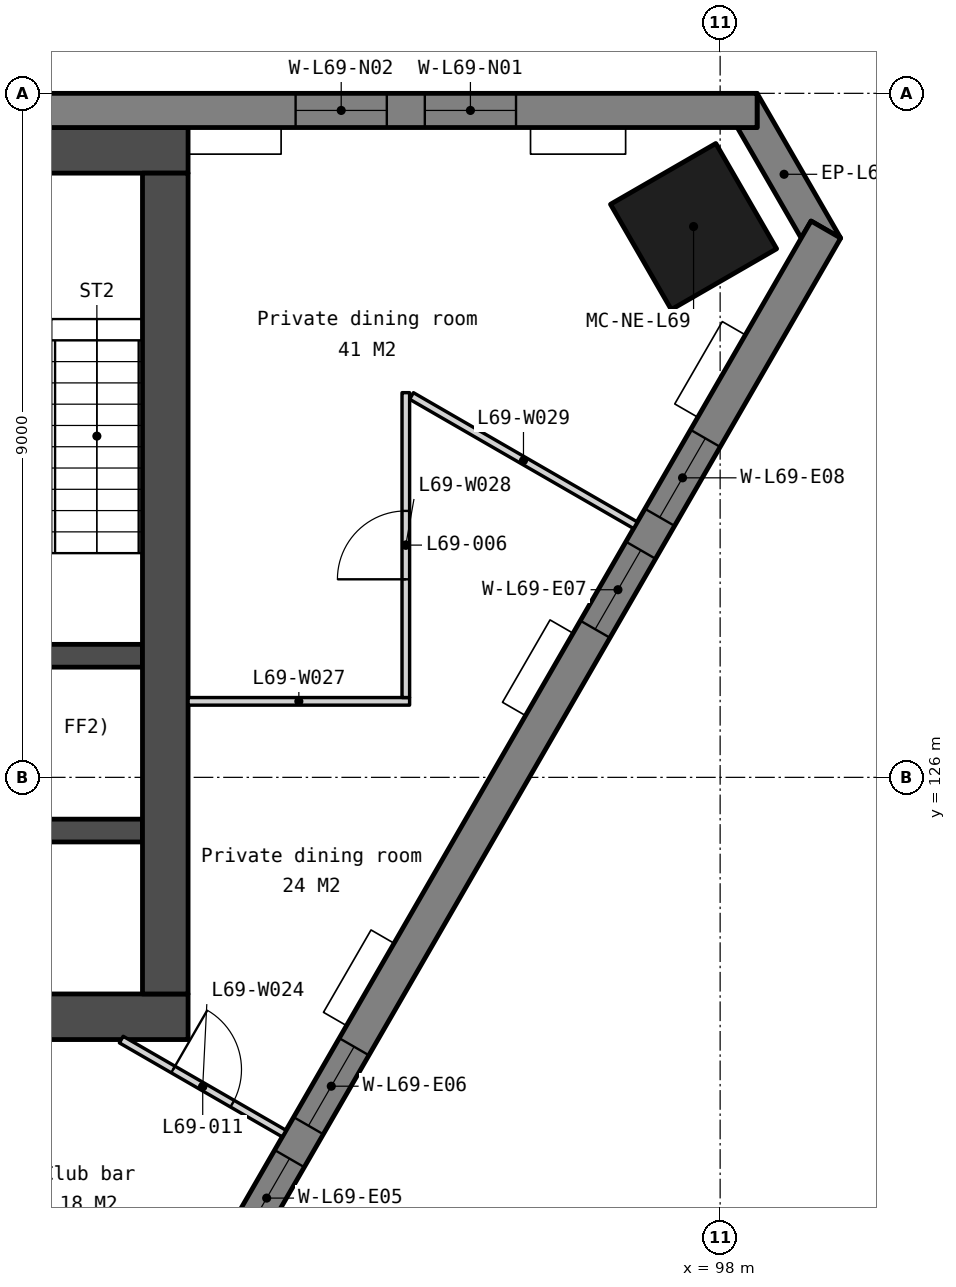
"""IFC4 building model, lengths in metres.
Left out: names, types, materials, properties, quantities, classifications, styles, units other than length and angle.
Written with IfcOpenShell. Run it as: python <this file> out.ifc"""

import sys

from ifc_helpers import new_model, si_unit, direction, frame, frame_2d, origin, origin_2d, place, context, subcontext, project, spatial, polyline, rectangle, outline, extrude, element, fill, save


model = new_model("IFC4")
c1 = context("Model", 3, precision=1e-05, world=origin(), true_north=direction((0.0, 1.0)))
c2 = subcontext(c1, "Body", "Model", "MODEL_VIEW")
j1 = project(units=[si_unit("LENGTHUNIT", "METRE"), si_unit("PLANEANGLEUNIT", "RADIAN")], contexts=[c1])
p1 = place(None, origin())
s1 = spatial("IfcSite", under=j1, at=p1, CompositionType="ELEMENT")
p2 = place(p1, origin())
s2 = spatial("IfcBuilding", under=s1, at=p2, CompositionType="ELEMENT")
p3 = place(p2, frame((0.0, 0.0, 281.6)))
s3 = spatial("IfcBuildingStorey", under=s2, at=p3, CompositionType="ELEMENT", Elevation=281.6)
p4 = place(p3, frame((97.651, 133.247, 0.0), z_axis=(0.0, 0.0, 1.0), x_axis=(-0.5, 0.866025403784, 0.0)))
e1 = element("IfcColumn", 1, at=p4, inside=s3, PredefinedType="COLUMN", context=c2, shape_type="SweptSolid", body=[
    extrude(rectangle(XDim=1.6, YDim=1.6, at=origin_2d()), origin(), (0.0, 0.0, 1.0), 3.9),
])
p5 = place(p3, frame((69.0, 134.25, 0.0), z_axis=(0.0, 0.0, 1.0), x_axis=(1.0, 0.0, 0.0)))
e2 = element("IfcWall", 2, at=p5, inside=s3, PredefinedType="SOLIDWALL", context=c2, shape_type="SweptSolid", body=[
    extrude(rectangle(XDim=22.0, YDim=0.6, at=frame_2d((11.0, 0.0))), origin(), (0.0, 0.0, 1.0), 3.5),
])
p6 = place(p3, frame((69.0, 122.85, 0.0), z_axis=(0.0, 0.0, 1.0), x_axis=(1.0, 0.0, 0.0)))
e3 = element("IfcWall", 3, at=p6, inside=s3, PredefinedType="SOLIDWALL", context=c2, shape_type="SweptSolid", body=[
    extrude(rectangle(XDim=22.0, YDim=0.6, at=frame_2d((11.0, 0.0))), origin(), (0.0, 0.0, 1.0), 3.5),
])
p7 = place(p6, frame((16.375, 0.0, 0.0)))
e4 = element("IfcOpeningElement", 4, at=p7, cuts=e3, PredefinedType="OPENING", context=c2, shape_type="SweptSolid", body=[
    extrude(rectangle(XDim=1.8, YDim=2.1, at=frame_2d((0.9, 1.05))), frame((0.0, 0.31, 0.0), z_axis=(0.0, -1.0, 0.0), x_axis=(1.0, 0.0, 0.0)), (0.0, 0.0, 1.0), 0.62),
])
p8 = place(p6, frame((3.825, 0.0, 0.0)))
e5 = element("IfcOpeningElement", 5, at=p8, cuts=e3, PredefinedType="OPENING", context=c2, shape_type="SweptSolid", body=[
    extrude(rectangle(XDim=1.8, YDim=2.1, at=frame_2d((0.9, 1.05))), frame((0.0, 0.31, 0.0), z_axis=(0.0, -1.0, 0.0), x_axis=(1.0, 0.0, 0.0)), (0.0, 0.0, 1.0), 0.62),
])
p9 = place(p6, frame((12.85, 0.0, 0.0)))
e6 = element("IfcOpeningElement", 6, at=p9, cuts=e3, PredefinedType="OPENING", context=c2, shape_type="SweptSolid", body=[
    extrude(rectangle(XDim=1.5, YDim=2.1, at=frame_2d((0.75, 1.05))), frame((0.0, 0.31, 0.0), z_axis=(0.0, -1.0, 0.0), x_axis=(1.0, 0.0, 0.0)), (0.0, 0.0, 1.0), 0.62),
])
for number, where, z_axis, x_axis in (
    (7, (87.85, 127.6, 0.0), (0.0, 0.0, 1.0), (1.0, 0.0, 0.0)),
    (8, (87.85, 125.3, 0.0), (0.0, 0.0, 1.0), (1.0, 0.0, 0.0)),
):
    element("IfcWall", number, at=place(p3, frame(where, z_axis=z_axis, x_axis=x_axis)), inside=s3, PredefinedType="SOLIDWALL", context=c2, shape_type="SweptSolid", body=[
        extrude(rectangle(XDim=2.55, YDim=0.3, at=frame_2d((1.275, 0.0))), origin(), (0.0, 0.0, 1.0), 3.5),
    ])
p10 = place(p3, frame((90.7, 133.95, 0.0), z_axis=(0.0, 0.0, 1.0), x_axis=(0.0, -1.0, 0.0)))
e9 = element("IfcWall", 9, at=p10, inside=s3, PredefinedType="SOLIDWALL", context=c2, shape_type="SweptSolid", body=[
    extrude(rectangle(XDim=10.8, YDim=0.6, at=frame_2d((5.4, 0.0))), origin(), (0.0, 0.0, 1.0), 3.5),
])
p11 = place(p3, frame((0.0, 0.0, -0.15)))
e10 = element("IfcWall", 10, at=p11, inside=s3, PredefinedType="SOLIDWALL", context=c2, shape_type="SweptSolid", body=[
    extrude(outline(polyline([(99.586, 133.095), (99.197, 133.32), (99.067, 133.095), (98.226, 134.55), (98.486, 134.55), (98.486, 135.0), (99.586, 133.095)])), origin(), (0.0, 0.0, 1.0), 3.55),
])
p12 = place(p3, frame((98.486, 134.775, -0.15), z_axis=(0.0, 0.0, 1.0), x_axis=(-1.0, 0.0, 0.0)))
e11 = element("IfcWall", 11, at=p12, inside=s3, PredefinedType="SOLIDWALL", context=c2, shape_type="SweptSolid", body=[
    extrude(outline(polyline([(36.972, 0.0), (36.972, 3.55), (0.0, 3.55), (0.0, 0.0), (36.972, 0.0)])), frame((0.0, 0.225, 0.0), z_axis=(0.0, -1.0, 0.0), x_axis=(1.0, 0.0, 0.0)), (0.0, 0.0, 1.0), 0.45),
])
p13 = place(p12, frame((3.172, 0.0, 0.95)))
e12 = element("IfcOpeningElement", 12, at=p13, cuts=e11, PredefinedType="OPENING", context=c2, shape_type="SweptSolid", body=[
    extrude(rectangle(XDim=1.2, YDim=2.2, at=frame_2d((0.6, 1.1))), frame((0.0, 0.235, 0.0), z_axis=(0.0, -1.0, 0.0), x_axis=(1.0, 0.0, 0.0)), (0.0, 0.0, 1.0), 0.47),
])
p14 = place(p12, frame((4.872, 0.0, 0.95)))
e13 = element("IfcOpeningElement", 13, at=p14, cuts=e11, PredefinedType="OPENING", context=c2, shape_type="SweptSolid", body=[
    extrude(rectangle(XDim=1.2, YDim=2.2, at=frame_2d((0.6, 1.1))), frame((0.0, 0.235, 0.0), z_axis=(0.0, -1.0, 0.0), x_axis=(1.0, 0.0, 0.0)), (0.0, 0.0, 1.0), 0.47),
])
p15 = place(p12, frame((12.415, 0.0, 0.95)))
e14 = element("IfcOpeningElement", 14, at=p15, cuts=e11, PredefinedType="OPENING", context=c2, shape_type="SweptSolid", body=[
    extrude(rectangle(XDim=1.2, YDim=2.2, at=frame_2d((0.6, 1.1))), frame((0.0, 0.235, 0.0), z_axis=(0.0, -1.0, 0.0), x_axis=(1.0, 0.0, 0.0)), (0.0, 0.0, 1.0), 0.47),
])
p16 = place(p12, frame((14.115, 0.0, 0.95)))
e15 = element("IfcOpeningElement", 15, at=p16, cuts=e11, PredefinedType="OPENING", context=c2, shape_type="SweptSolid", body=[
    extrude(rectangle(XDim=1.2, YDim=2.2, at=frame_2d((0.6, 1.1))), frame((0.0, 0.235, 0.0), z_axis=(0.0, -1.0, 0.0), x_axis=(1.0, 0.0, 0.0)), (0.0, 0.0, 1.0), 0.47),
])
p17 = place(p12, frame((21.658, 0.0, 0.95)))
e16 = element("IfcOpeningElement", 16, at=p17, cuts=e11, PredefinedType="OPENING", context=c2, shape_type="SweptSolid", body=[
    extrude(rectangle(XDim=1.2, YDim=2.2, at=frame_2d((0.6, 1.1))), frame((0.0, 0.235, 0.0), z_axis=(0.0, -1.0, 0.0), x_axis=(1.0, 0.0, 0.0)), (0.0, 0.0, 1.0), 0.47),
])
p18 = place(p12, frame((23.358, 0.0, 0.95)))
e17 = element("IfcOpeningElement", 17, at=p18, cuts=e11, PredefinedType="OPENING", context=c2, shape_type="SweptSolid", body=[
    extrude(rectangle(XDim=1.2, YDim=2.2, at=frame_2d((0.6, 1.1))), frame((0.0, 0.235, 0.0), z_axis=(0.0, -1.0, 0.0), x_axis=(1.0, 0.0, 0.0)), (0.0, 0.0, 1.0), 0.47),
])
p19 = place(p12, frame((30.901, 0.0, 0.95)))
e18 = element("IfcOpeningElement", 18, at=p19, cuts=e11, PredefinedType="OPENING", context=c2, shape_type="SweptSolid", body=[
    extrude(rectangle(XDim=1.2, YDim=2.2, at=frame_2d((0.6, 1.1))), frame((0.0, 0.235, 0.0), z_axis=(0.0, -1.0, 0.0), x_axis=(1.0, 0.0, 0.0)), (0.0, 0.0, 1.0), 0.47),
])
p20 = place(p12, frame((32.601, 0.0, 0.95)))
e19 = element("IfcOpeningElement", 19, at=p20, cuts=e11, PredefinedType="OPENING", context=c2, shape_type="SweptSolid", body=[
    extrude(rectangle(XDim=1.2, YDim=2.2, at=frame_2d((0.6, 1.1))), frame((0.0, 0.235, 0.0), z_axis=(0.0, -1.0, 0.0), x_axis=(1.0, 0.0, 0.0)), (0.0, 0.0, 1.0), 0.47),
])
p21 = place(p3, frame((80.905, 101.188, -0.15), z_axis=(0.0, 0.0, 1.0), x_axis=(0.500002536638, 0.866023939251, 0.0)))
e20 = element("IfcWall", 20, at=p21, inside=s3, PredefinedType="SOLIDWALL", context=c2, shape_type="SweptSolid", body=[
    extrude(outline(polyline([(36.972, 0.0), (36.972, 3.55), (0.0, 3.55), (0.0, 0.0), (36.972, 0.0)])), frame((0.0, 0.225, 0.0), z_axis=(0.0, -1.0, 0.0), x_axis=(1.0, 0.0, 0.0)), (0.0, 0.0, 1.0), 0.45),
])
p22 = place(p21, frame((3.172, 0.0, 0.95)))
e21 = element("IfcOpeningElement", 21, at=p22, cuts=e20, PredefinedType="OPENING", context=c2, shape_type="SweptSolid", body=[
    extrude(rectangle(XDim=1.2, YDim=2.2, at=frame_2d((0.6, 1.1))), frame((0.0, 0.235, 0.0), z_axis=(0.0, -1.0, 0.0), x_axis=(1.0, 0.0, 0.0)), (0.0, 0.0, 1.0), 0.47),
])
p23 = place(p21, frame((4.872, 0.0, 0.95)))
e22 = element("IfcOpeningElement", 22, at=p23, cuts=e20, PredefinedType="OPENING", context=c2, shape_type="SweptSolid", body=[
    extrude(rectangle(XDim=1.2, YDim=2.2, at=frame_2d((0.6, 1.1))), frame((0.0, 0.235, 0.0), z_axis=(0.0, -1.0, 0.0), x_axis=(1.0, 0.0, 0.0)), (0.0, 0.0, 1.0), 0.47),
])
p24 = place(p21, frame((12.415, 0.0, 0.95)))
e23 = element("IfcOpeningElement", 23, at=p24, cuts=e20, PredefinedType="OPENING", context=c2, shape_type="SweptSolid", body=[
    extrude(rectangle(XDim=1.2, YDim=2.2, at=frame_2d((0.6, 1.1))), frame((0.0, 0.235, 0.0), z_axis=(0.0, -1.0, 0.0), x_axis=(1.0, 0.0, 0.0)), (0.0, 0.0, 1.0), 0.47),
])
p25 = place(p21, frame((14.115, 0.0, 0.95)))
e24 = element("IfcOpeningElement", 24, at=p25, cuts=e20, PredefinedType="OPENING", context=c2, shape_type="SweptSolid", body=[
    extrude(rectangle(XDim=1.2, YDim=2.2, at=frame_2d((0.6, 1.1))), frame((0.0, 0.235, 0.0), z_axis=(0.0, -1.0, 0.0), x_axis=(1.0, 0.0, 0.0)), (0.0, 0.0, 1.0), 0.47),
])
p26 = place(p21, frame((21.658, 0.0, 0.95)))
e25 = element("IfcOpeningElement", 25, at=p26, cuts=e20, PredefinedType="OPENING", context=c2, shape_type="SweptSolid", body=[
    extrude(rectangle(XDim=1.2, YDim=2.2, at=frame_2d((0.6, 1.1))), frame((0.0, 0.235, 0.0), z_axis=(0.0, -1.0, 0.0), x_axis=(1.0, 0.0, 0.0)), (0.0, 0.0, 1.0), 0.47),
])
p27 = place(p21, frame((23.358, 0.0, 0.95)))
e26 = element("IfcOpeningElement", 26, at=p27, cuts=e20, PredefinedType="OPENING", context=c2, shape_type="SweptSolid", body=[
    extrude(rectangle(XDim=1.2, YDim=2.2, at=frame_2d((0.6, 1.1))), frame((0.0, 0.235, 0.0), z_axis=(0.0, -1.0, 0.0), x_axis=(1.0, 0.0, 0.0)), (0.0, 0.0, 1.0), 0.47),
])
p28 = place(p21, frame((30.901, 0.0, 0.95)))
e27 = element("IfcOpeningElement", 27, at=p28, cuts=e20, PredefinedType="OPENING", context=c2, shape_type="SweptSolid", body=[
    extrude(rectangle(XDim=1.2, YDim=2.2, at=frame_2d((0.6, 1.1))), frame((0.0, 0.235, 0.0), z_axis=(0.0, -1.0, 0.0), x_axis=(1.0, 0.0, 0.0)), (0.0, 0.0, 1.0), 0.47),
])
p29 = place(p21, frame((32.601, 0.0, 0.95)))
e28 = element("IfcOpeningElement", 28, at=p29, cuts=e20, PredefinedType="OPENING", context=c2, shape_type="SweptSolid", body=[
    extrude(rectangle(XDim=1.2, YDim=2.2, at=frame_2d((0.6, 1.1))), frame((0.0, 0.235, 0.0), z_axis=(0.0, -1.0, 0.0), x_axis=(1.0, 0.0, 0.0)), (0.0, 0.0, 1.0), 0.47),
])
p30 = place(p3, frame((90.121, 122.55, 0.0), z_axis=(0.0, 0.0, 1.0), x_axis=(0.86604923931, -0.499958713387, 0.0)))
e29 = element("IfcWall", 29, at=p30, inside=s3, PredefinedType="PARTITIONING", context=c2, shape_type="SweptSolid", body=[
    extrude(rectangle(XDim=2.475, YDim=0.1, at=frame_2d((1.237, 0.0))), origin(), (0.0, 0.0, 1.0), 3.5),
])
p31 = place(p30, frame((0.787, 0.0, 0.0)))
e30 = element("IfcOpeningElement", 30, at=p31, cuts=e29, PredefinedType="OPENING", context=c2, shape_type="SweptSolid", body=[
    extrude(rectangle(XDim=0.9, YDim=2.1, at=frame_2d((0.45, 1.05))), frame((0.0, 0.06, 0.0), z_axis=(0.0, -1.0, 0.0), x_axis=(1.0, 0.0, 0.0)), (0.0, 0.0, 1.0), 0.12),
])
p32 = place(p3, frame((91.0, 127.0, 0.0), z_axis=(0.0, 0.0, 1.0), x_axis=(1.0, 0.0, 0.0)))
e31 = element("IfcWall", 31, at=p32, inside=s3, PredefinedType="PARTITIONING", context=c2, shape_type="SweptSolid", body=[
    extrude(rectangle(XDim=2.915, YDim=0.1, at=frame_2d((1.457, 0.0))), origin(), (0.0, 0.0, 1.0), 3.5),
])
p33 = place(p3, frame((93.865, 127.05, 0.0), z_axis=(0.0, 0.0, 1.0), x_axis=(0.0, 1.0, 0.0)))
e32 = element("IfcWall", 32, at=p33, inside=s3, PredefinedType="PARTITIONING", context=c2, shape_type="SweptSolid", body=[
    extrude(rectangle(XDim=4.011, YDim=0.1, at=frame_2d((2.006, 0.0))), origin(), (0.0, 0.0, 1.0), 3.5),
])
p34 = place(p33, frame((1.556, 0.0, 0.0)))
e33 = element("IfcOpeningElement", 33, at=p34, cuts=e32, PredefinedType="OPENING", context=c2, shape_type="SweptSolid", body=[
    extrude(rectangle(XDim=0.9, YDim=2.1, at=frame_2d((0.45, 1.05))), frame((0.0, 0.06, 0.0), z_axis=(0.0, -1.0, 0.0), x_axis=(1.0, 0.0, 0.0)), (0.0, 0.0, 1.0), 0.12),
])
p35 = place(p3, frame((93.94, 131.018, 0.0), z_axis=(0.0, 0.0, 1.0), x_axis=(0.866021851682, -0.500006152372, 0.0)))
e34 = element("IfcWall", 34, at=p35, inside=s3, PredefinedType="PARTITIONING", context=c2, shape_type="SweptSolid", body=[
    extrude(rectangle(XDim=3.402, YDim=0.1, at=frame_2d((1.701, 0.0))), origin(), (0.0, 0.0, 1.0), 3.5),
])
p36 = place(p13, origin())
e35 = element("IfcWindow", 35, at=p36, inside=s3, PartitioningType="SINGLE_PANEL", PredefinedType="WINDOW", context=c2, shape_type="SweptSolid", body=[
    extrude(rectangle(XDim=1.2, YDim=2.2, at=frame_2d((0.6, 1.1))), frame((0.0, 0.03, 0.0), z_axis=(0.0, -1.0, 0.0), x_axis=(1.0, 0.0, 0.0)), (0.0, 0.0, 1.0), 0.06),
])
fill(e12, e35)
p37 = place(p14, origin())
e36 = element("IfcWindow", 36, at=p37, inside=s3, PartitioningType="SINGLE_PANEL", PredefinedType="WINDOW", context=c2, shape_type="SweptSolid", body=[
    extrude(rectangle(XDim=1.2, YDim=2.2, at=frame_2d((0.6, 1.1))), frame((0.0, 0.03, 0.0), z_axis=(0.0, -1.0, 0.0), x_axis=(1.0, 0.0, 0.0)), (0.0, 0.0, 1.0), 0.06),
])
fill(e13, e36)
p38 = place(p26, origin())
e37 = element("IfcWindow", 37, at=p38, inside=s3, PartitioningType="SINGLE_PANEL", PredefinedType="WINDOW", context=c2, shape_type="SweptSolid", body=[
    extrude(rectangle(XDim=1.2, YDim=2.2, at=frame_2d((0.6, 1.1))), frame((0.0, 0.03, 0.0), z_axis=(0.0, -1.0, 0.0), x_axis=(1.0, 0.0, 0.0)), (0.0, 0.0, 1.0), 0.06),
])
fill(e25, e37)
p39 = place(p27, origin())
e38 = element("IfcWindow", 38, at=p39, inside=s3, PartitioningType="SINGLE_PANEL", PredefinedType="WINDOW", context=c2, shape_type="SweptSolid", body=[
    extrude(rectangle(XDim=1.2, YDim=2.2, at=frame_2d((0.6, 1.1))), frame((0.0, 0.03, 0.0), z_axis=(0.0, -1.0, 0.0), x_axis=(1.0, 0.0, 0.0)), (0.0, 0.0, 1.0), 0.06),
])
fill(e26, e38)
p40 = place(p28, origin())
e39 = element("IfcWindow", 39, at=p40, inside=s3, PartitioningType="SINGLE_PANEL", PredefinedType="WINDOW", context=c2, shape_type="SweptSolid", body=[
    extrude(rectangle(XDim=1.2, YDim=2.2, at=frame_2d((0.6, 1.1))), frame((0.0, 0.03, 0.0), z_axis=(0.0, -1.0, 0.0), x_axis=(1.0, 0.0, 0.0)), (0.0, 0.0, 1.0), 0.06),
])
fill(e27, e39)
p41 = place(p29, origin())
e40 = element("IfcWindow", 40, at=p41, inside=s3, PartitioningType="SINGLE_PANEL", PredefinedType="WINDOW", context=c2, shape_type="SweptSolid", body=[
    extrude(rectangle(XDim=1.2, YDim=2.2, at=frame_2d((0.6, 1.1))), frame((0.0, 0.03, 0.0), z_axis=(0.0, -1.0, 0.0), x_axis=(1.0, 0.0, 0.0)), (0.0, 0.0, 1.0), 0.06),
])
fill(e28, e40)
p42 = place(p34, origin())
e41 = element("IfcDoor", 41, at=p42, inside=s3, OperationType="SINGLE_SWING_LEFT", PredefinedType="DOOR", context=c2, shape_type="SweptSolid", body=[
    extrude(rectangle(XDim=0.9, YDim=2.1, at=frame_2d((0.45, 1.05))), frame((0.0, 0.025, 0.0), z_axis=(0.0, -1.0, 0.0), x_axis=(1.0, 0.0, 0.0)), (0.0, 0.0, 1.0), 0.05),
])
fill(e33, e41)
p43 = place(p31, origin())
e42 = element("IfcDoor", 42, at=p43, inside=s3, OperationType="SINGLE_SWING_LEFT", PredefinedType="DOOR", context=c2, shape_type="SweptSolid", body=[
    extrude(rectangle(XDim=0.9, YDim=2.1, at=frame_2d((0.45, 1.05))), frame((0.0, 0.025, 0.0), z_axis=(0.0, -1.0, 0.0), x_axis=(1.0, 0.0, 0.0)), (0.0, 0.0, 1.0), 0.05),
])
fill(e30, e42)
save(model, sys.argv[1])
